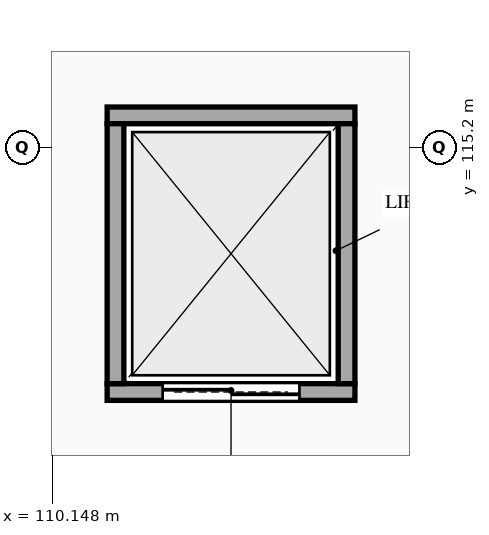
"""IFC4 building model, lengths in metres.
Left out: names, types, materials, properties, quantities, classifications, styles, units other than length and angle.
Written with IfcOpenShell. Run it as: python <this file> out.ifc"""

import sys

from ifc_helpers import new_model, si_unit, direction, frame, frame_2d, origin, place, context, subcontext, project, spatial, rectangle, extrude, element, fill, save


model = new_model("IFC4")
c1 = context("Model", 3, precision=1e-05, world=origin(), true_north=direction((0.0, 1.0)))
c2 = subcontext(c1, "Body", "Model", "MODEL_VIEW")
j1 = project(units=[si_unit("LENGTHUNIT", "METRE"), si_unit("PLANEANGLEUNIT", "RADIAN")], contexts=[c1])
p1 = place(None, origin())
s1 = spatial("IfcSite", under=j1, at=p1, CompositionType="ELEMENT")
p2 = place(p1, origin())
s2 = spatial("IfcBuilding", under=s1, at=p2, CompositionType="ELEMENT")
p3 = place(p2, frame((0.0, 0.0, 15.3)))
s3 = spatial("IfcBuildingStorey", under=s2, at=p3, CompositionType="ELEMENT", Elevation=15.3)
p4 = place(p3, frame((110.87, 111.98, 0.0), z_axis=(0.0, 0.0, 1.0), x_axis=(1.0, 0.0, 0.0)))
e1 = element("IfcWall", 1, at=p4, inside=s3, PredefinedType="STANDARD", context=c2, shape_type="SweptSolid", body=[
    extrude(rectangle(XDim=3.26, YDim=0.22, at=frame_2d((1.63, 0.0))), origin(), (0.0, 0.0, 1.0), 4.25),
])
p5 = place(p4, frame((0.73, 0.0, 0.0)))
e2 = element("IfcOpeningElement", 2, at=p5, cuts=e1, PredefinedType="OPENING", context=c2, shape_type="SweptSolid", body=[
    extrude(rectangle(XDim=1.8, YDim=2.35, at=frame_2d((0.9, 1.175))), frame((0.0, 0.12, 0.0), z_axis=(0.0, -1.0, 0.0), x_axis=(1.0, 0.0, 0.0)), (0.0, 0.0, 1.0), 0.24),
])
p6 = place(p3, frame((114.13, 115.62, 0.0), z_axis=(0.0, 0.0, 1.0), x_axis=(-1.0, 0.0, 0.0)))
e3 = element("IfcWall", 3, at=p6, inside=s3, PredefinedType="STANDARD", context=c2, shape_type="SweptSolid", body=[
    extrude(rectangle(XDim=3.26, YDim=0.22, at=frame_2d((1.63, 0.0))), origin(), (0.0, 0.0, 1.0), 4.25),
])
for number, where, z_axis, x_axis in (
    (4, (110.98, 115.51, 0.0), (0.0, 0.0, 1.0), (0.0, -1.0, 0.0)),
    (5, (114.02, 112.09, 0.0), (0.0, 0.0, 1.0), (0.0, 1.0, 0.0)),
):
    element("IfcWall", number, at=place(p3, frame(where, z_axis=z_axis, x_axis=x_axis)), inside=s3, PredefinedType="STANDARD", context=c2, shape_type="SweptSolid", body=[
        extrude(rectangle(XDim=3.42, YDim=0.22, at=frame_2d((1.71, 0.0))), origin(), (0.0, 0.0, 1.0), 4.25),
    ])
p7 = place(p5, origin())
e6 = element("IfcDoor", 6, at=p7, inside=s3, OperationType="DOUBLE_DOOR_SLIDING", PredefinedType="DOOR", context=c2, shape_type="SweptSolid", body=[
    extrude(rectangle(XDim=1.8, YDim=2.35, at=frame_2d((0.9, 1.175))), frame((0.0, 0.025, 0.0), z_axis=(0.0, -1.0, 0.0), x_axis=(1.0, 0.0, 0.0)), (0.0, 0.0, 1.0), 0.05),
])
fill(e2, e6)
save(model, sys.argv[1])
